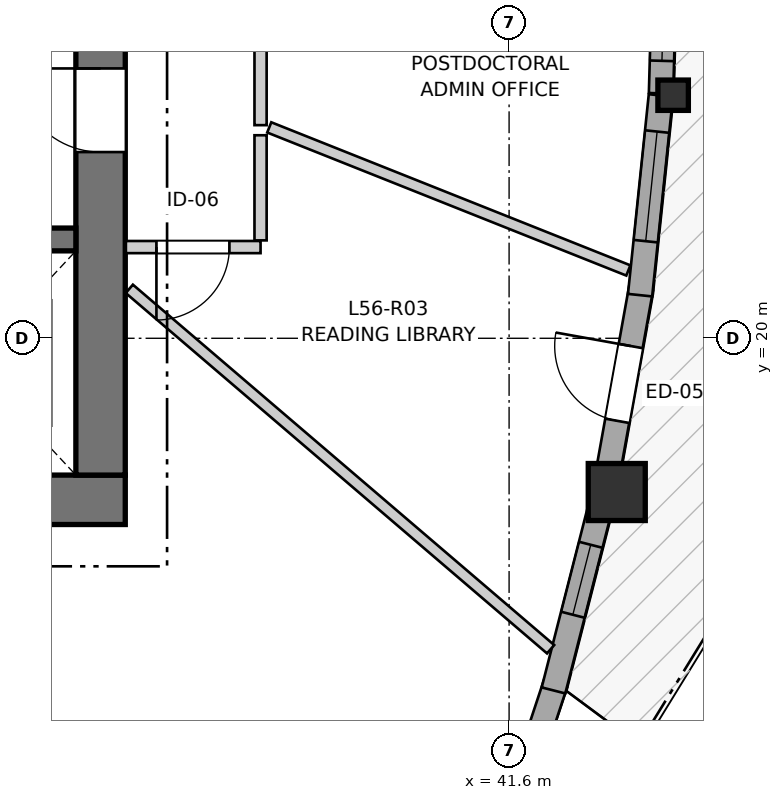
"""IFC4 building model, lengths in metres.
Left out: names, types, materials, properties, quantities, classifications, styles, units other than length and angle.
Written with IfcOpenShell. Run it as: python <this file> out.ifc"""

import sys

from ifc_helpers import new_model, si_unit, direction, frame, frame_2d, origin, origin_2d, place, context, subcontext, project, spatial, rectangle, i_section, extrude, source, transform, mapped, element, fill, save


model = new_model("IFC4")
c1 = context("Model", 3, precision=1e-05, world=origin(), true_north=direction((0.0, 1.0)))
c2 = subcontext(c1, "Body", "Model", "MODEL_VIEW")
j1 = project(units=[si_unit("LENGTHUNIT", "METRE"), si_unit("PLANEANGLEUNIT", "RADIAN")], contexts=[c1])
p1 = place(None, origin())
s1 = spatial("IfcSite", under=j1, at=p1, CompositionType="ELEMENT")
p2 = place(p1, origin())
s2 = spatial("IfcBuilding", under=s1, at=p2, CompositionType="ELEMENT")
p3 = place(p2, frame((0.0, 0.0, 187.4)))
s3 = spatial("IfcBuildingStorey", under=s2, at=p3, CompositionType="ELEMENT", Elevation=187.4)
p4 = place(p3, frame((24.15, 17.875, 0.0), z_axis=(0.0, 0.0, 1.0), x_axis=(1.0, 0.0, 0.0)))
e1 = element("IfcWall", 1, at=p4, inside=s3, PredefinedType="SHEAR", context=c2, shape_type="SweptSolid", body=[
    extrude(rectangle(XDim=12.4, YDim=0.65, at=frame_2d((6.2, 0.0))), origin(), (0.0, 0.0, 1.0), 2.9),
])
p5 = place(p3, frame((36.225, 18.2, 0.0), z_axis=(0.0, 0.0, 1.0), x_axis=(0.0, 1.0, 0.0)))
e2 = element("IfcWall", 2, at=p5, inside=s3, PredefinedType="SHEAR", context=c2, shape_type="SweptSolid", body=[
    extrude(rectangle(XDim=15.6, YDim=0.65, at=frame_2d((7.8, 0.0))), origin(), (0.0, 0.0, 1.0), 2.9),
])
p6 = place(p5, frame((4.25, 0.0, 0.0)))
e3 = element("IfcOpeningElement", 3, at=p6, cuts=e2, PredefinedType="OPENING", context=c2, shape_type="SweptSolid", body=[
    extrude(rectangle(XDim=1.1, YDim=2.15, at=frame_2d((0.55, 1.075))), frame((0.0, 0.335, 0.0), z_axis=(0.0, -1.0, 0.0), x_axis=(1.0, 0.0, 0.0)), (0.0, 0.0, 1.0), 0.67),
])
p7 = place(p5, frame((10.25, 0.0, 0.0)))
e4 = element("IfcOpeningElement", 4, at=p7, cuts=e2, PredefinedType="OPENING", context=c2, shape_type="SweptSolid", body=[
    extrude(rectangle(XDim=1.1, YDim=2.15, at=frame_2d((0.55, 1.075))), frame((0.0, 0.335, 0.0), z_axis=(0.0, -1.0, 0.0), x_axis=(1.0, 0.0, 0.0)), (0.0, 0.0, 1.0), 0.67),
])
p8 = place(p3, frame((24.8, 21.3, 0.0), z_axis=(0.0, 0.0, 1.0), x_axis=(1.0, 0.0, 0.0)))
e5 = element("IfcWall", 5, at=p8, inside=s3, PredefinedType="SHEAR", context=c2, shape_type="SweptSolid", body=[
    extrude(rectangle(XDim=11.1, YDim=0.3, at=frame_2d((5.55, 0.0))), origin(), (0.0, 0.0, 1.0), 2.9),
])
p9 = place(p8, frame((6.22, 0.0, 0.0)))
e6 = element("IfcOpeningElement", 6, at=p9, cuts=e5, PredefinedType="OPENING", context=c2, shape_type="SweptSolid", body=[
    extrude(rectangle(XDim=0.98, YDim=2.15, at=frame_2d((0.49, 1.075))), frame((0.0, 0.16, 0.0), z_axis=(0.0, -1.0, 0.0), x_axis=(1.0, 0.0, 0.0)), (0.0, 0.0, 1.0), 0.32),
])
p10 = place(p8, frame((9.15, 0.0, 0.0)))
e7 = element("IfcOpeningElement", 7, at=p10, cuts=e5, PredefinedType="OPENING", context=c2, shape_type="SweptSolid", body=[
    extrude(rectangle(XDim=1.15, YDim=2.15, at=frame_2d((0.575, 1.075))), frame((0.0, 0.16, 0.0), z_axis=(0.0, -1.0, 0.0), x_axis=(1.0, 0.0, 0.0)), (0.0, 0.0, 1.0), 0.32),
])
m1 = source(origin(), c2, "Body", "SweptSolid", [
    extrude(rectangle(XDim=0.75, YDim=0.75, at=origin_2d()), origin(), (0.0, 0.0, 1.0), 2.9),
])
p11 = place(p3, frame((43.017, 17.977, 0.0), z_axis=(0.0, 0.0, 1.0), x_axis=(1.0, 0.0, 0.0)))
e8 = element("IfcColumn", 8, at=p11, inside=s3, PredefinedType="COLUMN", context=c2, shape_type="MappedRepresentation", body=[
    mapped(m1, transform((0.0, 0.0, 0.0), x_axis=(1.0, 0.0, 0.0), y_axis=(0.0, 1.0, 0.0), z_axis=(0.0, 0.0, 1.0), scale=1.0)),
])
m2 = source(origin(), c2, "Body", "SweptSolid", [
    extrude(i_section(OverallWidth=0.401, OverallDepth=0.399, WebThickness=0.023, FlangeThickness=0.036, FilletRadius=0.015, at=origin_2d()), origin(), (0.0, 0.0, 1.0), 2.9),
])
p12 = place(p3, frame((43.758, 23.198, 0.0), z_axis=(0.0, 0.0, 1.0), x_axis=(1.0, 0.0, 0.0)))
e9 = element("IfcColumn", 9, at=p12, inside=s3, PredefinedType="PILASTER", context=c2, shape_type="MappedRepresentation", body=[
    mapped(m2, transform((0.0, 0.0, 0.0), x_axis=(1.0, 0.0, 0.0), y_axis=(0.0, 1.0, 0.0), z_axis=(0.0, 0.0, 1.0), scale=1.0)),
])
p13 = place(p3, frame((41.337, 12.819, 0.0), z_axis=(0.0, 0.0, 1.0), x_axis=(0.31443095402, 0.949280345922, 0.0)))
e10 = element("IfcWall", 10, at=p13, inside=s3, PredefinedType="SOLIDWALL", context=c2, shape_type="SweptSolid", body=[
    extrude(rectangle(XDim=2.773, YDim=0.32, at=frame_2d((1.386, 0.0))), origin(), (0.0, 0.0, 1.0), 2.48),
])
p14 = place(p13, frame((0.676, 0.0, 0.82)))
e11 = element("IfcOpeningElement", 11, at=p14, cuts=e10, PredefinedType="OPENING", context=c2, shape_type="SweptSolid", body=[
    extrude(rectangle(XDim=1.4, YDim=1.35, at=frame_2d((0.7, 0.675))), frame((0.0, 0.17, 0.0), z_axis=(0.0, -1.0, 0.0), x_axis=(1.0, 0.0, 0.0)), (0.0, 0.0, 1.0), 0.34),
])
p15 = place(p3, frame((42.184, 15.367, 0.0), z_axis=(0.0, 0.0, 1.0), x_axis=(0.247650778908, 0.968849364817, 0.0)))
e12 = element("IfcWall", 12, at=p15, inside=s3, PredefinedType="SOLIDWALL", context=c2, shape_type="SweptSolid", body=[
    extrude(rectangle(XDim=2.57, YDim=0.32, at=frame_2d((1.285, 0.0))), origin(), (0.0, 0.0, 1.0), 2.48),
])
p16 = place(p15, frame((1.028, 0.0, 0.82)))
e13 = element("IfcOpeningElement", 13, at=p16, cuts=e12, PredefinedType="OPENING", context=c2, shape_type="SweptSolid", body=[
    extrude(rectangle(XDim=0.95, YDim=1.35, at=frame_2d((0.475, 0.675))), frame((0.0, 0.17, 0.0), z_axis=(0.0, -1.0, 0.0), x_axis=(1.0, 0.0, 0.0)), (0.0, 0.0, 1.0), 0.34),
])
p17 = place(p3, frame((42.888, 18.168, 0.0), z_axis=(0.0, 0.0, 1.0), x_axis=(0.177158615295, 0.984182312901, 0.0)))
e14 = element("IfcWall", 14, at=p17, inside=s3, PredefinedType="SOLIDWALL", context=c2, shape_type="SweptSolid", body=[
    extrude(rectangle(XDim=2.526, YDim=0.32, at=frame_2d((1.263, 0.0))), origin(), (0.0, 0.0, 1.0), 2.48),
])
p18 = place(p17, frame((0.758, 0.0, 0.0)))
e15 = element("IfcOpeningElement", 15, at=p18, cuts=e14, PredefinedType="OPENING", context=c2, shape_type="SweptSolid", body=[
    extrude(rectangle(XDim=1.0, YDim=2.1, at=frame_2d((0.5, 1.05))), frame((0.0, 0.17, 0.0), z_axis=(0.0, -1.0, 0.0), x_axis=(1.0, 0.0, 0.0)), (0.0, 0.0, 1.0), 0.34),
])
p19 = place(p3, frame((43.323, 20.567, 0.0), z_axis=(0.0, 0.0, 1.0), x_axis=(0.10362132496, 0.9946168212, 0.0)))
e16 = element("IfcWall", 16, at=p19, inside=s3, PredefinedType="SOLIDWALL", context=c2, shape_type="SweptSolid", body=[
    extrude(rectangle(XDim=2.641, YDim=0.32, at=frame_2d((1.321, 0.0))), origin(), (0.0, 0.0, 1.0), 2.48),
])
p20 = place(p19, frame((0.714, 0.0, 0.82)))
e17 = element("IfcOpeningElement", 17, at=p20, cuts=e16, PredefinedType="OPENING", context=c2, shape_type="SweptSolid", body=[
    extrude(rectangle(XDim=1.45, YDim=1.25, at=frame_2d((0.725, 0.625))), frame((0.0, 0.17, 0.0), z_axis=(0.0, -1.0, 0.0), x_axis=(1.0, 0.0, 0.0)), (0.0, 0.0, 1.0), 0.34),
])
p21 = place(p3, frame((43.599, 23.222, 0.0), z_axis=(0.0, 0.0, 1.0), x_axis=(0.028259888897, 0.999600609583, 0.0)))
e18 = element("IfcWall", 18, at=p21, inside=s3, PredefinedType="SOLIDWALL", context=c2, shape_type="SweptSolid", body=[
    extrude(rectangle(XDim=2.626, YDim=0.32, at=frame_2d((1.313, 0.0))), origin(), (0.0, 0.0, 1.0), 2.48),
])
p22 = place(p21, frame((0.428, 0.0, 0.82)))
e19 = element("IfcOpeningElement", 19, at=p22, cuts=e18, PredefinedType="OPENING", context=c2, shape_type="SweptSolid", body=[
    extrude(rectangle(XDim=1.75, YDim=1.3, at=frame_2d((0.875, 0.65))), frame((0.0, 0.17, 0.0), z_axis=(0.0, -1.0, 0.0), x_axis=(1.0, 0.0, 0.0)), (0.0, 0.0, 1.0), 0.34),
])
p23 = place(p3, frame((38.33, 26.909, 0.0), z_axis=(0.0, 0.0, 1.0), x_axis=(0.0, -1.0, 0.0)))
e20 = element("IfcWall", 20, at=p23, inside=s3, PredefinedType="PARTITIONING", context=c2, shape_type="SweptSolid", body=[
    extrude(rectangle(XDim=4.105, YDim=0.16, at=frame_2d((2.052, 0.0))), origin(), (0.0, 0.0, 1.0), 2.9),
])
p24 = place(p23, frame((1.572, 0.0, 0.0)))
e21 = element("IfcOpeningElement", 21, at=p24, cuts=e20, PredefinedType="OPENING", context=c2, shape_type="SweptSolid", body=[
    extrude(rectangle(XDim=0.96, YDim=2.1, at=frame_2d((0.48, 1.05))), frame((0.0, 0.09, 0.0), z_axis=(0.0, -1.0, 0.0), x_axis=(1.0, 0.0, 0.0)), (0.0, 0.0, 1.0), 0.18),
])
p25 = place(p3, frame((38.33, 21.2, 0.0), z_axis=(0.0, 0.0, 1.0), x_axis=(-1.0, 0.0, 0.0)))
e22 = element("IfcWall", 22, at=p25, inside=s3, PredefinedType="PARTITIONING", context=c2, shape_type="SweptSolid", body=[
    extrude(rectangle(XDim=1.772, YDim=0.16, at=frame_2d((0.886, 0.0))), origin(), (0.0, 0.0, 1.0), 2.9),
])
p26 = place(p25, frame((0.41, 0.0, 0.0)))
e23 = element("IfcOpeningElement", 23, at=p26, cuts=e22, PredefinedType="OPENING", context=c2, shape_type="SweptSolid", body=[
    extrude(rectangle(XDim=0.96, YDim=2.1, at=frame_2d((0.48, 1.05))), frame((0.0, 0.09, 0.0), z_axis=(0.0, -1.0, 0.0), x_axis=(1.0, 0.0, 0.0)), (0.0, 0.0, 1.0), 0.18),
])
p27 = place(p3, frame((36.603, 20.65, 0.0), z_axis=(0.0, 0.0, 1.0), x_axis=(0.759924803985, -0.650010993975, 0.0)))
e24 = element("IfcWall", 24, at=p27, inside=s3, PredefinedType="PARTITIONING", context=c2, shape_type="SweptSolid", body=[
    extrude(rectangle(XDim=7.294, YDim=0.145, at=frame_2d((3.647, 0.0))), origin(), (0.0, 0.0, 1.0), 2.9),
])
p28 = place(p3, frame((38.444, 22.774, 0.0), z_axis=(0.0, 0.0, 1.0), x_axis=(0.928995588187, -0.37009079579, 0.0)))
e25 = element("IfcWall", 25, at=p28, inside=s3, PredefinedType="PARTITIONING", context=c2, shape_type="SweptSolid", body=[
    extrude(rectangle(XDim=5.085, YDim=0.145, at=frame_2d((2.543, 0.0))), origin(), (0.0, 0.0, 1.0), 2.9),
])
p29 = place(p3, frame((38.33, 21.288, 0.0), z_axis=(0.0, 0.0, 1.0), x_axis=(0.0, 1.0, 0.0)))
e26 = element("IfcWall", 26, at=p29, inside=s3, PredefinedType="PARTITIONING", context=c2, shape_type="SweptSolid", body=[
    extrude(rectangle(XDim=1.383, YDim=0.16, at=frame_2d((0.691, 0.0))), origin(), (0.0, 0.0, 1.0), 2.9),
])
m3 = source(origin(), c2, "Body", "SweptSolid", [
    extrude(rectangle(XDim=0.95, YDim=1.35, at=frame_2d((0.475, 0.675))), frame((0.0, 0.03, 0.0), z_axis=(0.0, -1.0, 0.0), x_axis=(1.0, 0.0, 0.0)), (0.0, 0.0, 1.0), 0.06),
])
p30 = place(p16, origin())
e27 = element("IfcWindow", 27, at=p30, inside=s3, PartitioningType="SINGLE_PANEL", PredefinedType="WINDOW", context=c2, shape_type="MappedRepresentation", body=[
    mapped(m3, transform((0.0, 0.0, 0.0), x_axis=(1.0, 0.0, 0.0), y_axis=(0.0, 1.0, 0.0), z_axis=(0.0, 0.0, 1.0), scale=1.0)),
])
fill(e13, e27)
m4 = source(origin(), c2, "Body", "SweptSolid", [
    extrude(rectangle(XDim=1.0, YDim=2.1, at=frame_2d((0.5, 1.05))), frame((0.0, 0.025, 0.0), z_axis=(0.0, -1.0, 0.0), x_axis=(1.0, 0.0, 0.0)), (0.0, 0.0, 1.0), 0.05),
])
p31 = place(p18, origin())
e28 = element("IfcDoor", 28, at=p31, inside=s3, OperationType="SINGLE_SWING_RIGHT", PredefinedType="DOOR", context=c2, shape_type="MappedRepresentation", body=[
    mapped(m4, transform((0.0, 0.0, 0.0), x_axis=(1.0, 0.0, 0.0), y_axis=(0.0, 1.0, 0.0), z_axis=(0.0, 0.0, 1.0), scale=1.0)),
])
fill(e15, e28)
m5 = source(origin(), c2, "Body", "SweptSolid", [
    extrude(rectangle(XDim=1.45, YDim=1.25, at=frame_2d((0.725, 0.625))), frame((0.0, 0.03, 0.0), z_axis=(0.0, -1.0, 0.0), x_axis=(1.0, 0.0, 0.0)), (0.0, 0.0, 1.0), 0.06),
])
p32 = place(p20, origin())
e29 = element("IfcWindow", 29, at=p32, inside=s3, PartitioningType="SINGLE_PANEL", PredefinedType="WINDOW", context=c2, shape_type="MappedRepresentation", body=[
    mapped(m5, transform((0.0, 0.0, 0.0), x_axis=(1.0, 0.0, 0.0), y_axis=(0.0, 1.0, 0.0), z_axis=(0.0, 0.0, 1.0), scale=1.0)),
])
fill(e17, e29)
m6 = source(origin(), c2, "Body", "SweptSolid", [
    extrude(rectangle(XDim=1.75, YDim=1.3, at=frame_2d((0.875, 0.65))), frame((0.0, 0.03, 0.0), z_axis=(0.0, -1.0, 0.0), x_axis=(1.0, 0.0, 0.0)), (0.0, 0.0, 1.0), 0.06),
])
p33 = place(p22, origin())
e30 = element("IfcWindow", 30, at=p33, inside=s3, PartitioningType="SINGLE_PANEL", PredefinedType="WINDOW", context=c2, shape_type="MappedRepresentation", body=[
    mapped(m6, transform((0.0, 0.0, 0.0), x_axis=(1.0, 0.0, 0.0), y_axis=(0.0, 1.0, 0.0), z_axis=(0.0, 0.0, 1.0), scale=1.0)),
])
fill(e19, e30)
m7 = source(origin(), c2, "Body", "SweptSolid", [
    extrude(rectangle(XDim=1.1, YDim=2.15, at=frame_2d((0.55, 1.075))), frame((0.0, 0.025, 0.0), z_axis=(0.0, -1.0, 0.0), x_axis=(1.0, 0.0, 0.0)), (0.0, 0.0, 1.0), 0.05),
])
p34 = place(p6, origin())
e31 = element("IfcDoor", 31, at=p34, inside=s3, OperationType="SINGLE_SWING_RIGHT", PredefinedType="DOOR", context=c2, shape_type="MappedRepresentation", body=[
    mapped(m7, transform((0.0, 0.0, 0.0), x_axis=(1.0, 0.0, 0.0), y_axis=(0.0, 1.0, 0.0), z_axis=(0.0, 0.0, 1.0), scale=1.0)),
])
fill(e3, e31)
m8 = source(origin(), c2, "Body", "SweptSolid", [
    extrude(rectangle(XDim=0.96, YDim=2.1, at=frame_2d((0.48, 1.05))), frame((0.0, 0.025, 0.0), z_axis=(0.0, -1.0, 0.0), x_axis=(1.0, 0.0, 0.0)), (0.0, 0.0, 1.0), 0.05),
])
p35 = place(p26, origin())
e32 = element("IfcDoor", 32, at=p35, inside=s3, OperationType="SINGLE_SWING_RIGHT", PredefinedType="DOOR", context=c2, shape_type="MappedRepresentation", body=[
    mapped(m8, transform((0.0, 0.0, 0.0), x_axis=(1.0, 0.0, 0.0), y_axis=(0.0, 1.0, 0.0), z_axis=(0.0, 0.0, 1.0), scale=1.0)),
])
fill(e23, e32)
save(model, sys.argv[1])
